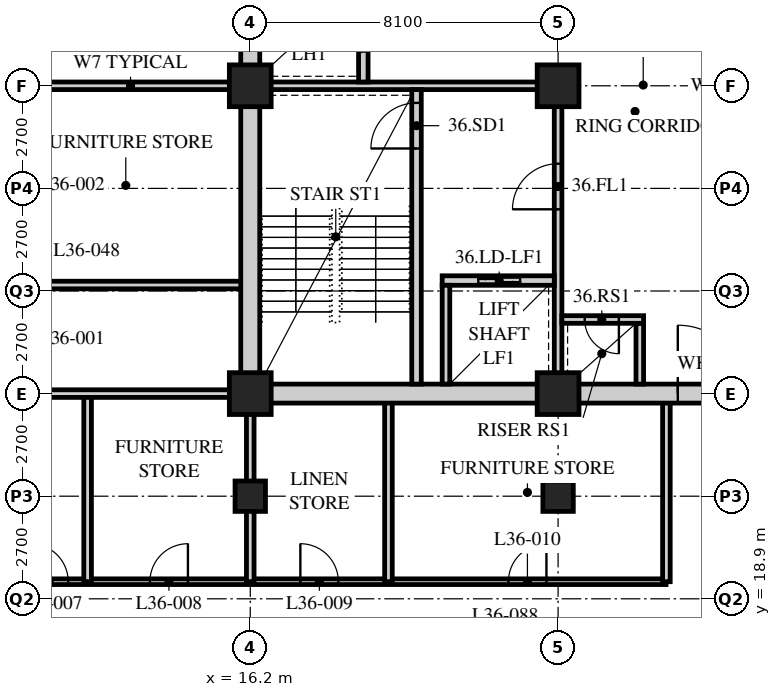
"""IFC4 building model, lengths in metres.
Left out: names, types, materials, properties, quantities, classifications, styles, units other than length and angle.
Written with IfcOpenShell. Run it as: python <this file> out.ifc"""

import sys

from ifc_helpers import new_model, si_unit, direction, frame, frame_2d, origin, origin_2d, place, context, subcontext, project, spatial, rectangle, hollow_rectangle, extrude, element, fill, save


model = new_model("IFC4")
c1 = context("Model", 3, precision=1e-05, world=origin(), true_north=direction((0.0, 1.0)))
c2 = subcontext(c1, "Body", "Model", "MODEL_VIEW")
j1 = project(units=[si_unit("LENGTHUNIT", "METRE"), si_unit("PLANEANGLEUNIT", "RADIAN")], contexts=[c1])
p1 = place(None, origin())
s1 = spatial("IfcSite", under=j1, at=p1, CompositionType="ELEMENT")
p2 = place(p1, origin())
s2 = spatial("IfcBuilding", under=s1, at=p2, CompositionType="ELEMENT")
p3 = place(p2, frame((0.0, 0.0, 140.8)))
s3 = spatial("IfcBuildingStorey", under=s2, at=p3, CompositionType="ELEMENT", Elevation=140.8)
p4 = place(p3, frame((16.2, 21.6, 0.0), z_axis=(0.0, 0.0, 1.0), x_axis=(1.0, 0.0, 0.0)))
e1 = element("IfcColumn", 1, at=p4, inside=s3, PredefinedType="COLUMN", context=c2, shape_type="SweptSolid", body=[
    extrude(hollow_rectangle(XDim=0.8, YDim=0.8, WallThickness=0.08, at=origin_2d()), origin(), (0.0, 0.0, 1.0), 3.4),
])
for number, where, z_axis, x_axis in (
    (2, (16.2, 24.3, 0.0), (0.0, 0.0, 1.0), (1.0, 0.0, 0.0)),
    (3, (16.2, 32.4, 0.0), (0.0, 0.0, 1.0), (1.0, 0.0, 0.0)),
):
    element("IfcColumn", number, at=place(p3, frame(where, z_axis=z_axis, x_axis=x_axis)), inside=s3, PredefinedType="COLUMN", context=c2, shape_type="SweptSolid", body=[
        extrude(hollow_rectangle(XDim=1.1, YDim=1.1, WallThickness=0.1, at=origin_2d()), origin(), (0.0, 0.0, 1.0), 3.4),
    ])
p5 = place(p3, frame((24.3, 21.6, 0.0), z_axis=(0.0, 0.0, 1.0), x_axis=(1.0, 0.0, 0.0)))
e4 = element("IfcColumn", 4, at=p5, inside=s3, PredefinedType="COLUMN", context=c2, shape_type="SweptSolid", body=[
    extrude(hollow_rectangle(XDim=0.8, YDim=0.8, WallThickness=0.08, at=origin_2d()), origin(), (0.0, 0.0, 1.0), 3.4),
])
for number, where, z_axis, x_axis in (
    (5, (24.3, 24.3, 0.0), (0.0, 0.0, 1.0), (1.0, 0.0, 0.0)),
    (6, (24.3, 32.4, 0.0), (0.0, 0.0, 1.0), (1.0, 0.0, 0.0)),
):
    element("IfcColumn", number, at=place(p3, frame(where, z_axis=z_axis, x_axis=x_axis)), inside=s3, PredefinedType="COLUMN", context=c2, shape_type="SweptSolid", body=[
        extrude(hollow_rectangle(XDim=1.1, YDim=1.1, WallThickness=0.1, at=origin_2d()), origin(), (0.0, 0.0, 1.0), 3.4),
    ])
p6 = place(p3, frame((9.9, 19.35, 0.0), z_axis=(0.0, 0.0, 1.0), x_axis=(1.0, 0.0, 0.0)))
e7 = element("IfcWall", 7, at=p6, inside=s3, PredefinedType="PARTITIONING", context=c2, shape_type="SweptSolid", body=[
    extrude(rectangle(XDim=17.24, YDim=0.15, at=frame_2d((8.62, 0.0))), origin(), (0.0, 0.0, 1.0), 3.19),
])
p7 = place(p6, frame((0.51, 0.0, 0.0)))
e8 = element("IfcOpeningElement", 8, at=p7, cuts=e7, PredefinedType="OPENING", context=c2, shape_type="SweptSolid", body=[
    extrude(rectangle(XDim=1.0, YDim=2.1, at=frame_2d((0.5, 1.05))), frame((0.0, 0.085, 0.0), z_axis=(0.0, -1.0, 0.0), x_axis=(1.0, 0.0, 0.0)), (0.0, 0.0, 1.0), 0.17),
])
p8 = place(p6, frame((3.66, 0.0, 0.0)))
e9 = element("IfcOpeningElement", 9, at=p8, cuts=e7, PredefinedType="OPENING", context=c2, shape_type="SweptSolid", body=[
    extrude(rectangle(XDim=1.0, YDim=2.1, at=frame_2d((0.5, 1.05))), frame((0.0, 0.085, 0.0), z_axis=(0.0, -1.0, 0.0), x_axis=(1.0, 0.0, 0.0)), (0.0, 0.0, 1.0), 0.17),
])
p9 = place(p6, frame((7.618, 0.0, 0.0)))
e10 = element("IfcOpeningElement", 10, at=p9, cuts=e7, PredefinedType="OPENING", context=c2, shape_type="SweptSolid", body=[
    extrude(rectangle(XDim=1.0, YDim=2.1, at=frame_2d((0.5, 1.05))), frame((0.0, 0.085, 0.0), z_axis=(0.0, -1.0, 0.0), x_axis=(1.0, 0.0, 0.0)), (0.0, 0.0, 1.0), 0.17),
])
p10 = place(p6, frame((13.093, 0.0, 0.0)))
e11 = element("IfcOpeningElement", 11, at=p10, cuts=e7, PredefinedType="OPENING", context=c2, shape_type="SweptSolid", body=[
    extrude(rectangle(XDim=1.0, YDim=2.1, at=frame_2d((0.5, 1.05))), frame((0.0, 0.085, 0.0), z_axis=(0.0, -1.0, 0.0), x_axis=(1.0, 0.0, 0.0)), (0.0, 0.0, 1.0), 0.17),
])
for number, where, z_axis, x_axis in (
    (12, (9.9, 32.4, 0.0), (0.0, 0.0, 1.0), (1.0, 0.0, 0.0)),
    (13, (9.9, 27.157, 0.0), (0.0, 0.0, 1.0), (1.0, 0.0, 0.0)),
):
    element("IfcWall", number, at=place(p3, frame(where, z_axis=z_axis, x_axis=x_axis)), inside=s3, PredefinedType="SOLIDWALL", context=c2, shape_type="SweptSolid", body=[
        extrude(rectangle(XDim=6.3, YDim=0.2, at=frame_2d((3.15, 0.0))), origin(), (0.0, 0.0, 1.0), 3.19),
    ])
p11 = place(p3, frame((16.2, 19.35, 0.0), z_axis=(0.0, 0.0, 1.0), x_axis=(0.0, 1.0, 0.0)))
e14 = element("IfcWall", 14, at=p11, inside=s3, PredefinedType="SOLIDWALL", context=c2, shape_type="SweptSolid", body=[
    extrude(rectangle(XDim=4.95, YDim=0.2, at=frame_2d((2.475, 0.0))), origin(), (0.0, 0.0, 1.0), 2.49),
])
for number, where, z_axis, x_axis in (
    (15, (11.92, 19.35, 0.0), (0.0, 0.0, 1.0), (0.0, 1.0, 0.0)),
    (16, (19.836, 19.35, 0.0), (0.0, 0.0, 1.0), (0.0, 1.0, 0.0)),
    (17, (27.15, 19.35, 0.0), (0.0, 0.0, 1.0), (0.0, 1.0, 0.0)),
):
    element("IfcWall", number, at=place(p3, frame(where, z_axis=z_axis, x_axis=x_axis)), inside=s3, PredefinedType="SOLIDWALL", context=c2, shape_type="SweptSolid", body=[
        extrude(rectangle(XDim=4.95, YDim=0.2, at=frame_2d((2.475, 0.0))), origin(), (0.0, 0.0, 1.0), 3.19),
    ])
p12 = place(p3, frame((9.9, 24.3, 0.0), z_axis=(0.0, 0.0, 1.0), x_axis=(1.0, 0.0, 0.0)))
e18 = element("IfcWall", 18, at=p12, inside=s3, PredefinedType="SOLIDWALL", context=c2, shape_type="SweptSolid", body=[
    extrude(rectangle(XDim=6.3, YDim=0.2, at=frame_2d((3.15, 0.0))), origin(), (0.0, 0.0, 1.0), 3.19),
])
p13 = place(p3, frame((15.95, 24.3, 0.0), z_axis=(0.0, 0.0, 1.0), x_axis=(1.0, 0.0, 0.0)))
e19 = element("IfcWall", 19, at=p13, inside=s3, PredefinedType="SOLIDWALL", context=c2, shape_type="SweptSolid", body=[
    extrude(rectangle(XDim=24.8, YDim=0.5, at=frame_2d((12.4, 0.0))), origin(), (0.0, 0.0, 1.0), 2.54),
])
p14 = place(p13, frame((11.5, 0.0, 0.0)))
e20 = element("IfcOpeningElement", 20, at=p14, cuts=e19, PredefinedType="OPENING", context=c2, shape_type="SweptSolid", body=[
    extrude(rectangle(XDim=1.8, YDim=2.4, at=frame_2d((0.9, 1.2))), frame((0.0, 0.26, 0.0), z_axis=(0.0, -1.0, 0.0), x_axis=(1.0, 0.0, 0.0)), (0.0, 0.0, 1.0), 0.52),
])
p15 = place(p3, frame((16.2, 24.55, 0.0), z_axis=(0.0, 0.0, 1.0), x_axis=(0.0, 1.0, 0.0)))
e21 = element("IfcWall", 21, at=p15, inside=s3, PredefinedType="SOLIDWALL", context=c2, shape_type="SweptSolid", body=[
    extrude(rectangle(XDim=15.7, YDim=0.5, at=frame_2d((7.85, 0.0))), origin(), (0.0, 0.0, 1.0), 2.578),
])
p16 = place(p3, frame((16.45, 32.4, 0.0), z_axis=(0.0, 0.0, 1.0), x_axis=(1.0, 0.0, 0.0)))
e22 = element("IfcWall", 22, at=p16, inside=s3, PredefinedType="SOLIDWALL", context=c2, shape_type="SweptSolid", body=[
    extrude(rectangle(XDim=7.95, YDim=0.2, at=frame_2d((3.975, 0.0))), origin(), (0.0, 0.0, 1.0), 2.578),
])
p17 = place(p3, frame((24.3, 24.55, 0.0), z_axis=(0.0, 0.0, 1.0), x_axis=(0.0, 1.0, 0.0)))
e23 = element("IfcWall", 23, at=p17, inside=s3, PredefinedType="SOLIDWALL", context=c2, shape_type="SweptSolid", body=[
    extrude(rectangle(XDim=7.75, YDim=0.2, at=frame_2d((3.875, 0.0))), origin(), (0.0, 0.0, 1.0), 2.578),
])
p18 = place(p17, frame((4.6, 0.0, 0.0)))
e24 = element("IfcOpeningElement", 24, at=p18, cuts=e23, PredefinedType="OPENING", context=c2, shape_type="SweptSolid", body=[
    extrude(rectangle(XDim=1.2, YDim=2.1, at=frame_2d((0.6, 1.05))), frame((0.0, 0.11, 0.0), z_axis=(0.0, -1.0, 0.0), x_axis=(1.0, 0.0, 0.0)), (0.0, 0.0, 1.0), 0.22),
])
p19 = place(p3, frame((20.575, 24.55, 0.0), z_axis=(0.0, 0.0, 1.0), x_axis=(0.0, 1.0, 0.0)))
e25 = element("IfcWall", 25, at=p19, inside=s3, PredefinedType="SOLIDWALL", context=c2, shape_type="SweptSolid", body=[
    extrude(rectangle(XDim=7.75, YDim=0.25, at=frame_2d((3.875, 0.0))), origin(), (0.0, 0.0, 1.0), 3.19),
])
p20 = place(p19, frame((6.2, 0.0, 0.0)))
e26 = element("IfcOpeningElement", 26, at=p20, cuts=e25, PredefinedType="OPENING", context=c2, shape_type="SweptSolid", body=[
    extrude(rectangle(XDim=1.2, YDim=2.1, at=frame_2d((0.6, 1.05))), frame((0.0, 0.135, 0.0), z_axis=(0.0, -1.0, 0.0), x_axis=(1.0, 0.0, 0.0)), (0.0, 0.0, 1.0), 0.27),
])
p21 = place(p3, frame((21.25, 27.275, 0.0), z_axis=(0.0, 0.0, 1.0), x_axis=(1.0, 0.0, 0.0)))
e27 = element("IfcWall", 27, at=p21, inside=s3, PredefinedType="SOLIDWALL", context=c2, shape_type="SweptSolid", body=[
    extrude(rectangle(XDim=2.95, YDim=0.25, at=frame_2d((1.475, 0.0))), origin(), (0.0, 0.0, 1.0), 3.19),
])
p22 = place(p21, frame((0.95, 0.0, 0.0)))
e28 = element("IfcOpeningElement", 28, at=p22, cuts=e27, PredefinedType="OPENING", context=c2, shape_type="SweptSolid", body=[
    extrude(rectangle(XDim=1.1, YDim=2.4, at=frame_2d((0.55, 1.2))), frame((0.0, 0.135, 0.0), z_axis=(0.0, -1.0, 0.0), x_axis=(1.0, 0.0, 0.0)), (0.0, 0.0, 1.0), 0.27),
])
p23 = place(p3, frame((21.35, 24.55, 0.0), z_axis=(0.0, 0.0, 1.0), x_axis=(0.0, 1.0, 0.0)))
e29 = element("IfcWall", 29, at=p23, inside=s3, PredefinedType="SOLIDWALL", context=c2, shape_type="SweptSolid", body=[
    extrude(rectangle(XDim=2.6, YDim=0.2, at=frame_2d((1.3, 0.0))), origin(), (0.0, 0.0, 1.0), 3.19),
])
p24 = place(p3, frame((19.175, 32.5, 0.0), z_axis=(0.0, 0.0, 1.0), x_axis=(0.0, 1.0, 0.0)))
e30 = element("IfcWall", 30, at=p24, inside=s3, PredefinedType="SOLIDWALL", context=c2, shape_type="SweptSolid", body=[
    extrude(rectangle(XDim=7.75, YDim=0.25, at=frame_2d((3.875, 0.0))), origin(), (0.0, 0.0, 1.0), 3.19),
])
p25 = place(p24, frame((0.8, 0.0, 0.0)))
e31 = element("IfcOpeningElement", 31, at=p25, cuts=e30, PredefinedType="OPENING", context=c2, shape_type="SweptSolid", body=[
    extrude(rectangle(XDim=1.1, YDim=2.4, at=frame_2d((0.55, 1.2))), frame((0.0, 0.135, 0.0), z_axis=(0.0, -1.0, 0.0), x_axis=(1.0, 0.0, 0.0)), (0.0, 0.0, 1.0), 0.27),
])
p26 = place(p24, frame((3.4, 0.0, 0.0)))
e32 = element("IfcOpeningElement", 32, at=p26, cuts=e30, PredefinedType="OPENING", context=c2, shape_type="SweptSolid", body=[
    extrude(rectangle(XDim=1.1, YDim=2.4, at=frame_2d((0.55, 1.2))), frame((0.0, 0.135, 0.0), z_axis=(0.0, -1.0, 0.0), x_axis=(1.0, 0.0, 0.0)), (0.0, 0.0, 1.0), 0.27),
])
p27 = place(p24, frame((6.0, 0.0, 0.0)))
e33 = element("IfcOpeningElement", 33, at=p27, cuts=e30, PredefinedType="OPENING", context=c2, shape_type="SweptSolid", body=[
    extrude(rectangle(XDim=1.1, YDim=2.4, at=frame_2d((0.55, 1.2))), frame((0.0, 0.135, 0.0), z_axis=(0.0, -1.0, 0.0), x_axis=(1.0, 0.0, 0.0)), (0.0, 0.0, 1.0), 0.27),
])
p28 = place(p3, frame((26.45, 24.55, 0.0), z_axis=(0.0, 0.0, 1.0), x_axis=(0.0, 1.0, 0.0)))
e34 = element("IfcWall", 34, at=p28, inside=s3, PredefinedType="SOLIDWALL", context=c2, shape_type="SweptSolid", body=[
    extrude(rectangle(XDim=1.6, YDim=0.2, at=frame_2d((0.8, 0.0))), origin(), (0.0, 0.0, 1.0), 3.19),
])
p29 = place(p3, frame((24.4, 26.25, 0.0), z_axis=(0.0, 0.0, 1.0), x_axis=(1.0, 0.0, 0.0)))
e35 = element("IfcWall", 35, at=p29, inside=s3, PredefinedType="SOLIDWALL", context=c2, shape_type="SweptSolid", body=[
    extrude(rectangle(XDim=2.15, YDim=0.2, at=frame_2d((1.075, 0.0))), origin(), (0.0, 0.0, 1.0), 3.19),
])
p30 = place(p29, frame((0.6, 0.0, 0.0)))
e36 = element("IfcOpeningElement", 36, at=p30, cuts=e35, PredefinedType="OPENING", context=c2, shape_type="SweptSolid", body=[
    extrude(rectangle(XDim=0.9, YDim=2.1, at=frame_2d((0.45, 1.05))), frame((0.0, 0.11, 0.0), z_axis=(0.0, -1.0, 0.0), x_axis=(1.0, 0.0, 0.0)), (0.0, 0.0, 1.0), 0.22),
])
p31 = place(p7, origin())
e37 = element("IfcDoor", 37, at=p31, inside=s3, OperationType="SINGLE_SWING_LEFT", PredefinedType="DOOR", context=c2, shape_type="SweptSolid", body=[
    extrude(rectangle(XDim=1.0, YDim=2.1, at=frame_2d((0.5, 1.05))), frame((0.0, 0.025, 0.0), z_axis=(0.0, -1.0, 0.0), x_axis=(1.0, 0.0, 0.0)), (0.0, 0.0, 1.0), 0.05),
])
fill(e8, e37)
p32 = place(p8, origin())
e38 = element("IfcDoor", 38, at=p32, inside=s3, OperationType="SINGLE_SWING_RIGHT", PredefinedType="DOOR", context=c2, shape_type="SweptSolid", body=[
    extrude(rectangle(XDim=1.0, YDim=2.1, at=frame_2d((0.5, 1.05))), frame((0.0, 0.025, 0.0), z_axis=(0.0, -1.0, 0.0), x_axis=(1.0, 0.0, 0.0)), (0.0, 0.0, 1.0), 0.05),
])
fill(e9, e38)
p33 = place(p9, origin())
e39 = element("IfcDoor", 39, at=p33, inside=s3, OperationType="SINGLE_SWING_LEFT", PredefinedType="DOOR", context=c2, shape_type="SweptSolid", body=[
    extrude(rectangle(XDim=1.0, YDim=2.1, at=frame_2d((0.5, 1.05))), frame((0.0, 0.025, 0.0), z_axis=(0.0, -1.0, 0.0), x_axis=(1.0, 0.0, 0.0)), (0.0, 0.0, 1.0), 0.05),
])
fill(e10, e39)
p34 = place(p10, origin())
e40 = element("IfcDoor", 40, at=p34, inside=s3, OperationType="SINGLE_SWING_RIGHT", PredefinedType="DOOR", context=c2, shape_type="SweptSolid", body=[
    extrude(rectangle(XDim=1.0, YDim=2.1, at=frame_2d((0.5, 1.05))), frame((0.0, 0.025, 0.0), z_axis=(0.0, -1.0, 0.0), x_axis=(1.0, 0.0, 0.0)), (0.0, 0.0, 1.0), 0.05),
])
fill(e11, e40)
p35 = place(p20, origin())
e41 = element("IfcDoor", 41, at=p35, inside=s3, OperationType="SINGLE_SWING_LEFT", PredefinedType="DOOR", context=c2, shape_type="SweptSolid", body=[
    extrude(rectangle(XDim=1.2, YDim=2.1, at=frame_2d((0.6, 1.05))), frame((0.0, 0.025, 0.0), z_axis=(0.0, -1.0, 0.0), x_axis=(1.0, 0.0, 0.0)), (0.0, 0.0, 1.0), 0.05),
])
fill(e26, e41)
p36 = place(p18, origin())
e42 = element("IfcDoor", 42, at=p36, inside=s3, OperationType="SINGLE_SWING_LEFT", PredefinedType="DOOR", context=c2, shape_type="SweptSolid", body=[
    extrude(rectangle(XDim=1.2, YDim=2.1, at=frame_2d((0.6, 1.05))), frame((0.0, 0.025, 0.0), z_axis=(0.0, -1.0, 0.0), x_axis=(1.0, 0.0, 0.0)), (0.0, 0.0, 1.0), 0.05),
])
fill(e24, e42)
p37 = place(p30, origin())
e43 = element("IfcDoor", 43, at=p37, inside=s3, OperationType="SINGLE_SWING_LEFT", PredefinedType="DOOR", context=c2, shape_type="SweptSolid", body=[
    extrude(rectangle(XDim=0.9, YDim=2.1, at=frame_2d((0.45, 1.05))), frame((0.0, 0.025, 0.0), z_axis=(0.0, -1.0, 0.0), x_axis=(1.0, 0.0, 0.0)), (0.0, 0.0, 1.0), 0.05),
])
fill(e36, e43)
p38 = place(p22, origin())
e44 = element("IfcDoor", 44, at=p38, inside=s3, OperationType="DOUBLE_DOOR_SLIDING", PredefinedType="DOOR", context=c2, shape_type="SweptSolid", body=[
    extrude(rectangle(XDim=1.1, YDim=2.4, at=frame_2d((0.55, 1.2))), frame((0.0, 0.025, 0.0), z_axis=(0.0, -1.0, 0.0), x_axis=(1.0, 0.0, 0.0)), (0.0, 0.0, 1.0), 0.05),
])
fill(e28, e44)
p39 = place(p14, origin())
e45 = element("IfcDoor", 45, at=p39, inside=s3, OperationType="DOUBLE_DOOR_SINGLE_SWING", PredefinedType="DOOR", context=c2, shape_type="SweptSolid", body=[
    extrude(rectangle(XDim=1.8, YDim=2.4, at=frame_2d((0.9, 1.2))), frame((0.0, 0.025, 0.0), z_axis=(0.0, -1.0, 0.0), x_axis=(1.0, 0.0, 0.0)), (0.0, 0.0, 1.0), 0.05),
])
fill(e20, e45)
save(model, sys.argv[1])
